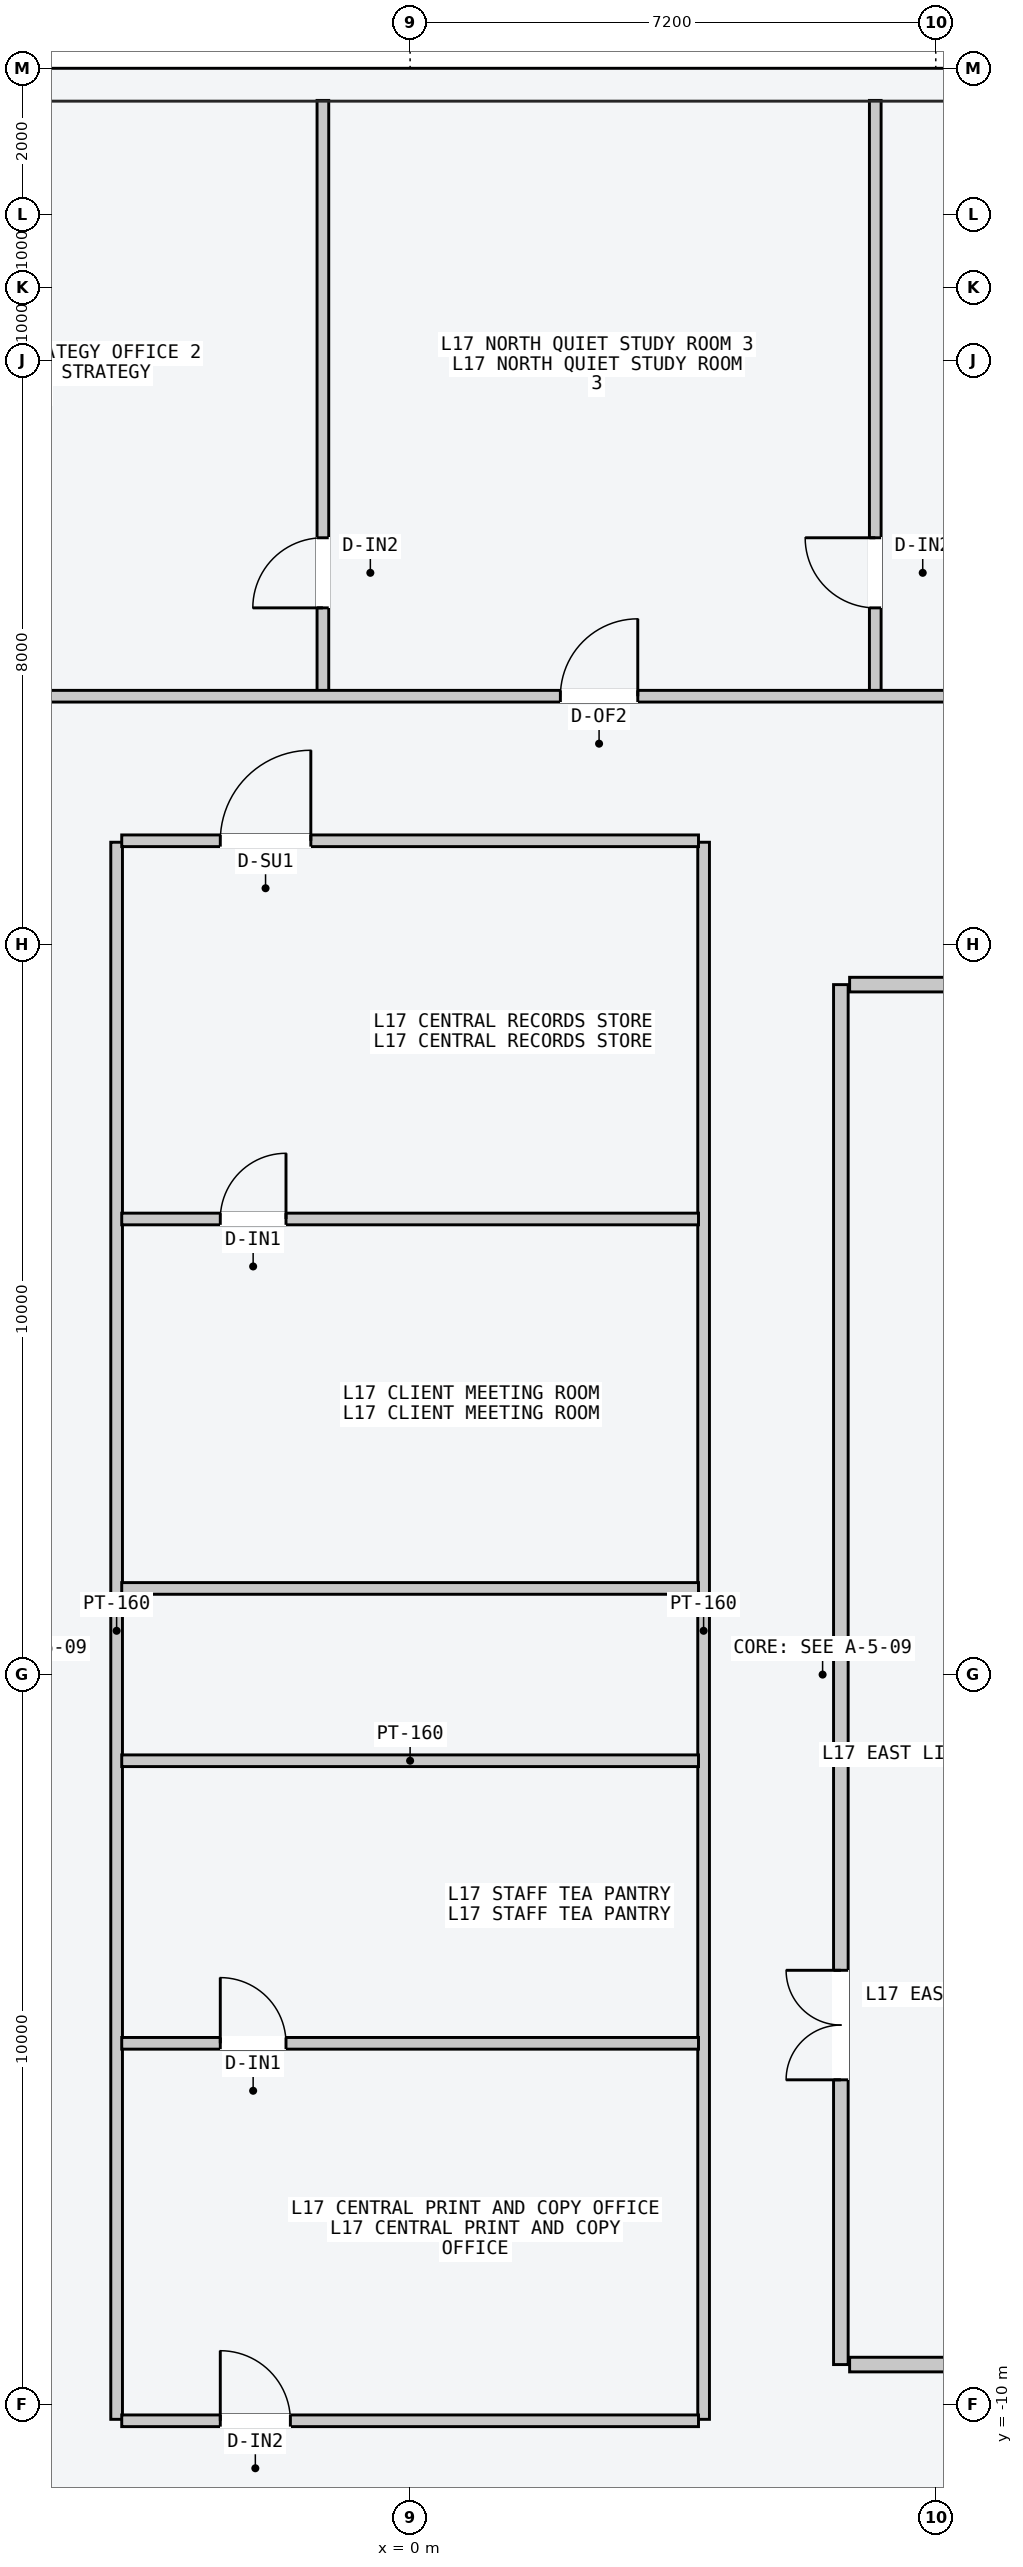
"""IFC4 building model, lengths in metres.
Left out: names, types, materials, properties, quantities, classifications, styles, units other than length and angle.
Written with IfcOpenShell. Run it as: python <this file> out.ifc"""

import sys

from ifc_helpers import new_model, si_unit, direction, frame, frame_2d, origin, place, context, subcontext, project, spatial, rectangle, extrude, element, fill, save


model = new_model("IFC4")
c1 = context("Model", 3, precision=1e-05, world=origin(), true_north=direction((0.0, 1.0)))
c2 = subcontext(c1, "Body", "Model", "MODEL_VIEW")
j1 = project(units=[si_unit("LENGTHUNIT", "METRE"), si_unit("PLANEANGLEUNIT", "RADIAN")], contexts=[c1])
p1 = place(None, origin())
s1 = spatial("IfcSite", under=j1, at=p1, CompositionType="ELEMENT")
p2 = place(p1, origin())
s2 = spatial("IfcBuilding", under=s1, at=p2, CompositionType="ELEMENT")
p3 = place(p2, frame((0.0, 0.0, 67.2)))
s3 = spatial("IfcBuildingStorey", under=s2, at=p3, CompositionType="ELEMENT", Elevation=67.2)
p4 = place(p3, frame((5.9, -9.45, 0.0), z_axis=(0.0, 0.0, 1.0), x_axis=(0.0, 1.0, 0.0)))
e1 = element("IfcWall", 1, at=p4, inside=s3, PredefinedType="PARTITIONING", context=c2, shape_type="SweptSolid", body=[
    extrude(rectangle(XDim=18.9, YDim=0.2, at=frame_2d((9.45, 0.0))), origin(), (0.0, 0.0, 1.0), 3.4),
])
p5 = place(p4, frame((3.9, 0.0, 0.0)))
e2 = element("IfcOpeningElement", 2, at=p5, cuts=e1, PredefinedType="OPENING", context=c2, shape_type="SweptSolid", body=[
    extrude(rectangle(XDim=1.5, YDim=2.2, at=frame_2d((0.75, 1.1))), frame((0.0, 0.11, 0.0), z_axis=(0.0, -1.0, 0.0), x_axis=(1.0, 0.0, 0.0)), (0.0, 0.0, 1.0), 0.22),
])
for number, where, z_axis, x_axis in (
    (3, (6.02, -9.45, 0.0), (0.0, 0.0, 1.0), (1.0, 0.0, 0.0)),
    (4, (6.02, 9.45, 0.0), (0.0, 0.0, 1.0), (1.0, 0.0, 0.0)),
):
    element("IfcWall", number, at=place(p3, frame(where, z_axis=z_axis, x_axis=x_axis)), inside=s3, PredefinedType="PARTITIONING", context=c2, shape_type="SweptSolid", body=[
        extrude(rectangle(XDim=1.8, YDim=0.2, at=frame_2d((0.9, 0.0))), origin(), (0.0, 0.0, 1.0), 3.4),
    ])
for number, where, z_axis, x_axis in (
    (5, (-4.02, -10.2, 0.0), (0.0, 0.0, 1.0), (0.0, 1.0, 0.0)),
    (6, (4.02, -10.2, 0.0), (0.0, 0.0, 1.0), (0.0, 1.0, 0.0)),
):
    element("IfcWall", number, at=place(p3, frame(where, z_axis=z_axis, x_axis=x_axis)), inside=s3, PredefinedType="PARTITIONING", context=c2, shape_type="SweptSolid", body=[
        extrude(rectangle(XDim=21.6, YDim=0.16, at=frame_2d((10.8, 0.0))), origin(), (0.0, 0.0, 1.0), 3.4),
    ])
p6 = place(p3, frame((-3.95, 1.18, 0.0), z_axis=(0.0, 0.0, 1.0), x_axis=(1.0, 0.0, 0.0)))
e7 = element("IfcWall", 7, at=p6, inside=s3, PredefinedType="PARTITIONING", context=c2, shape_type="SweptSolid", body=[
    extrude(rectangle(XDim=7.9, YDim=0.16, at=frame_2d((3.95, 0.0))), origin(), (0.0, 0.0, 1.0), 3.4),
])
p7 = place(p3, frame((-3.95, 11.42, 0.0), z_axis=(0.0, 0.0, 1.0), x_axis=(1.0, 0.0, 0.0)))
e8 = element("IfcWall", 8, at=p7, inside=s3, PredefinedType="PARTITIONING", context=c2, shape_type="SweptSolid", body=[
    extrude(rectangle(XDim=7.9, YDim=0.16, at=frame_2d((3.95, 0.0))), origin(), (0.0, 0.0, 1.0), 3.4),
])
p8 = place(p7, frame((1.35, 0.0, 0.0)))
e9 = element("IfcOpeningElement", 9, at=p8, cuts=e8, PredefinedType="OPENING", context=c2, shape_type="SweptSolid", body=[
    extrude(rectangle(XDim=1.24, YDim=2.24, at=frame_2d((0.62, 1.12))), frame((0.0, 0.09, 0.0), z_axis=(0.0, -1.0, 0.0), x_axis=(1.0, 0.0, 0.0)), (0.0, 0.0, 1.0), 0.18),
])
p9 = place(p3, frame((-3.95, -1.18, 0.0), z_axis=(0.0, 0.0, 1.0), x_axis=(1.0, 0.0, 0.0)))
e10 = element("IfcWall", 10, at=p9, inside=s3, PredefinedType="PARTITIONING", context=c2, shape_type="SweptSolid", body=[
    extrude(rectangle(XDim=7.9, YDim=0.16, at=frame_2d((3.95, 0.0))), origin(), (0.0, 0.0, 1.0), 3.4),
])
p10 = place(p3, frame((-3.95, -10.22, 0.0), z_axis=(0.0, 0.0, 1.0), x_axis=(1.0, 0.0, 0.0)))
e11 = element("IfcWall", 11, at=p10, inside=s3, PredefinedType="PARTITIONING", context=c2, shape_type="SweptSolid", body=[
    extrude(rectangle(XDim=7.9, YDim=0.16, at=frame_2d((3.95, 0.0))), origin(), (0.0, 0.0, 1.0), 3.4),
])
p11 = place(p10, frame((1.35, 0.0, 0.0)))
e12 = element("IfcOpeningElement", 12, at=p11, cuts=e11, PredefinedType="OPENING", context=c2, shape_type="SweptSolid", body=[
    extrude(rectangle(XDim=0.96, YDim=2.18, at=frame_2d((0.48, 1.09))), frame((0.0, 0.09, 0.0), z_axis=(0.0, -1.0, 0.0), x_axis=(1.0, 0.0, 0.0)), (0.0, 0.0, 1.0), 0.18),
])
p12 = place(p3, frame((-3.95, 6.24, 0.0), z_axis=(0.0, 0.0, 1.0), x_axis=(1.0, 0.0, 0.0)))
e13 = element("IfcWall", 13, at=p12, inside=s3, PredefinedType="PARTITIONING", context=c2, shape_type="SweptSolid", body=[
    extrude(rectangle(XDim=7.9, YDim=0.16, at=frame_2d((3.95, 0.0))), origin(), (0.0, 0.0, 1.0), 3.4),
])
p13 = place(p12, frame((1.35, 0.0, 0.0)))
e14 = element("IfcOpeningElement", 14, at=p13, cuts=e13, PredefinedType="OPENING", context=c2, shape_type="SweptSolid", body=[
    extrude(rectangle(XDim=0.9, YDim=2.15, at=frame_2d((0.45, 1.075))), frame((0.0, 0.09, 0.0), z_axis=(0.0, -1.0, 0.0), x_axis=(1.0, 0.0, 0.0)), (0.0, 0.0, 1.0), 0.18),
])
p14 = place(p3, frame((-3.95, -5.05, 0.0), z_axis=(0.0, 0.0, 1.0), x_axis=(1.0, 0.0, 0.0)))
e15 = element("IfcWall", 15, at=p14, inside=s3, PredefinedType="PARTITIONING", context=c2, shape_type="SweptSolid", body=[
    extrude(rectangle(XDim=7.9, YDim=0.16, at=frame_2d((3.95, 0.0))), origin(), (0.0, 0.0, 1.0), 3.4),
])
p15 = place(p14, frame((1.35, 0.0, 0.0)))
e16 = element("IfcOpeningElement", 16, at=p15, cuts=e15, PredefinedType="OPENING", context=c2, shape_type="SweptSolid", body=[
    extrude(rectangle(XDim=0.9, YDim=2.15, at=frame_2d((0.45, 1.075))), frame((0.0, 0.09, 0.0), z_axis=(0.0, -1.0, 0.0), x_axis=(1.0, 0.0, 0.0)), (0.0, 0.0, 1.0), 0.18),
])
p16 = place(p3, frame((-1.195, 13.46, 0.0), z_axis=(0.0, 0.0, 1.0), x_axis=(0.0, 1.0, 0.0)))
e17 = element("IfcWall", 17, at=p16, inside=s3, PredefinedType="PARTITIONING", context=c2, shape_type="SweptSolid", body=[
    extrude(rectangle(XDim=8.1, YDim=0.16, at=frame_2d((4.05, 0.0))), origin(), (0.0, 0.0, 1.0), 3.4),
])
p17 = place(p16, frame((1.15, 0.0, 0.0)))
e18 = element("IfcOpeningElement", 18, at=p17, cuts=e17, PredefinedType="OPENING", context=c2, shape_type="SweptSolid", body=[
    extrude(rectangle(XDim=0.96, YDim=2.18, at=frame_2d((0.48, 1.09))), frame((0.0, 0.09, 0.0), z_axis=(0.0, -1.0, 0.0), x_axis=(1.0, 0.0, 0.0)), (0.0, 0.0, 1.0), 0.18),
])
p18 = place(p3, frame((6.371, 13.46, 0.0), z_axis=(0.0, 0.0, 1.0), x_axis=(0.0, 1.0, 0.0)))
e19 = element("IfcWall", 19, at=p18, inside=s3, PredefinedType="PARTITIONING", context=c2, shape_type="SweptSolid", body=[
    extrude(rectangle(XDim=8.1, YDim=0.16, at=frame_2d((4.05, 0.0))), origin(), (0.0, 0.0, 1.0), 3.4),
])
p19 = place(p18, frame((1.15, 0.0, 0.0)))
e20 = element("IfcOpeningElement", 20, at=p19, cuts=e19, PredefinedType="OPENING", context=c2, shape_type="SweptSolid", body=[
    extrude(rectangle(XDim=0.96, YDim=2.18, at=frame_2d((0.48, 1.09))), frame((0.0, 0.09, 0.0), z_axis=(0.0, -1.0, 0.0), x_axis=(1.0, 0.0, 0.0)), (0.0, 0.0, 1.0), 0.18),
])
p20 = place(p3, frame((-19.2, 13.4, 0.0), z_axis=(0.0, 0.0, 1.0), x_axis=(1.0, 0.0, 0.0)))
e21 = element("IfcWall", 21, at=p20, inside=s3, PredefinedType="PARTITIONING", context=c2, shape_type="SweptSolid", body=[
    extrude(rectangle(XDim=38.4, YDim=0.16, at=frame_2d((19.2, 0.0))), origin(), (0.0, 0.0, 1.0), 3.4),
])
p21 = place(p20, frame((4.143, 0.0, 0.0)))
e22 = element("IfcOpeningElement", 22, at=p21, cuts=e21, PredefinedType="OPENING", context=c2, shape_type="SweptSolid", body=[
    extrude(rectangle(XDim=0.96, YDim=2.18, at=frame_2d((0.48, 1.09))), frame((0.0, 0.09, 0.0), z_axis=(0.0, -1.0, 0.0), x_axis=(1.0, 0.0, 0.0)), (0.0, 0.0, 1.0), 0.18),
])
p22 = place(p20, frame((13.115, 0.0, 0.0)))
e23 = element("IfcOpeningElement", 23, at=p22, cuts=e21, PredefinedType="OPENING", context=c2, shape_type="SweptSolid", body=[
    extrude(rectangle(XDim=1.02, YDim=2.2, at=frame_2d((0.51, 1.1))), frame((0.0, 0.09, 0.0), z_axis=(0.0, -1.0, 0.0), x_axis=(1.0, 0.0, 0.0)), (0.0, 0.0, 1.0), 0.18),
])
p23 = place(p20, frame((21.258, 0.0, 0.0)))
e24 = element("IfcOpeningElement", 24, at=p23, cuts=e21, PredefinedType="OPENING", context=c2, shape_type="SweptSolid", body=[
    extrude(rectangle(XDim=1.06, YDim=2.2, at=frame_2d((0.53, 1.1))), frame((0.0, 0.09, 0.0), z_axis=(0.0, -1.0, 0.0), x_axis=(1.0, 0.0, 0.0)), (0.0, 0.0, 1.0), 0.18),
])
p24 = place(p20, frame((28.535, 0.0, 0.0)))
e25 = element("IfcOpeningElement", 25, at=p24, cuts=e21, PredefinedType="OPENING", context=c2, shape_type="SweptSolid", body=[
    extrude(rectangle(XDim=1.24, YDim=2.24, at=frame_2d((0.62, 1.12))), frame((0.0, 0.09, 0.0), z_axis=(0.0, -1.0, 0.0), x_axis=(1.0, 0.0, 0.0)), (0.0, 0.0, 1.0), 0.18),
])
p25 = place(p20, frame((34.869, 0.0, 0.0)))
e26 = element("IfcOpeningElement", 26, at=p25, cuts=e21, PredefinedType="OPENING", context=c2, shape_type="SweptSolid", body=[
    extrude(rectangle(XDim=1.4, YDim=2.2, at=frame_2d((0.7, 1.1))), frame((0.0, 0.09, 0.0), z_axis=(0.0, -1.0, 0.0), x_axis=(1.0, 0.0, 0.0)), (0.0, 0.0, 1.0), 0.18),
])
p26 = place(p5, origin())
e27 = element("IfcDoor", 27, at=p26, inside=s3, OperationType="DOUBLE_DOOR_SINGLE_SWING", PredefinedType="DOOR", context=c2, shape_type="SweptSolid", body=[
    extrude(rectangle(XDim=1.5, YDim=2.2, at=frame_2d((0.75, 1.1))), frame((0.0, 0.025, 0.0), z_axis=(0.0, -1.0, 0.0), x_axis=(1.0, 0.0, 0.0)), (0.0, 0.0, 1.0), 0.05),
])
fill(e2, e27)
p27 = place(p8, origin())
e28 = element("IfcDoor", 28, at=p27, inside=s3, OperationType="SINGLE_SWING_RIGHT", PredefinedType="DOOR", context=c2, shape_type="SweptSolid", body=[
    extrude(rectangle(XDim=1.24, YDim=2.24, at=frame_2d((0.62, 1.12))), frame((0.0, 0.025, 0.0), z_axis=(0.0, -1.0, 0.0), x_axis=(1.0, 0.0, 0.0)), (0.0, 0.0, 1.0), 0.05),
])
fill(e9, e28)
p28 = place(p11, origin())
e29 = element("IfcDoor", 29, at=p28, inside=s3, OperationType="SINGLE_SWING_LEFT", PredefinedType="DOOR", context=c2, shape_type="SweptSolid", body=[
    extrude(rectangle(XDim=0.96, YDim=2.18, at=frame_2d((0.48, 1.09))), frame((0.0, 0.025, 0.0), z_axis=(0.0, -1.0, 0.0), x_axis=(1.0, 0.0, 0.0)), (0.0, 0.0, 1.0), 0.05),
])
fill(e12, e29)
p29 = place(p13, origin())
e30 = element("IfcDoor", 30, at=p29, inside=s3, OperationType="SINGLE_SWING_RIGHT", PredefinedType="DOOR", context=c2, shape_type="SweptSolid", body=[
    extrude(rectangle(XDim=0.9, YDim=2.15, at=frame_2d((0.45, 1.075))), frame((0.0, 0.025, 0.0), z_axis=(0.0, -1.0, 0.0), x_axis=(1.0, 0.0, 0.0)), (0.0, 0.0, 1.0), 0.05),
])
fill(e14, e30)
p30 = place(p15, origin())
e31 = element("IfcDoor", 31, at=p30, inside=s3, OperationType="SINGLE_SWING_LEFT", PredefinedType="DOOR", context=c2, shape_type="SweptSolid", body=[
    extrude(rectangle(XDim=0.9, YDim=2.15, at=frame_2d((0.45, 1.075))), frame((0.0, 0.025, 0.0), z_axis=(0.0, -1.0, 0.0), x_axis=(1.0, 0.0, 0.0)), (0.0, 0.0, 1.0), 0.05),
])
fill(e16, e31)
p31 = place(p17, origin())
e32 = element("IfcDoor", 32, at=p31, inside=s3, OperationType="SINGLE_SWING_LEFT", PredefinedType="DOOR", context=c2, shape_type="SweptSolid", body=[
    extrude(rectangle(XDim=0.96, YDim=2.18, at=frame_2d((0.48, 1.09))), frame((0.0, 0.025, 0.0), z_axis=(0.0, -1.0, 0.0), x_axis=(1.0, 0.0, 0.0)), (0.0, 0.0, 1.0), 0.05),
])
fill(e18, e32)
p32 = place(p19, origin())
e33 = element("IfcDoor", 33, at=p32, inside=s3, OperationType="SINGLE_SWING_RIGHT", PredefinedType="DOOR", context=c2, shape_type="SweptSolid", body=[
    extrude(rectangle(XDim=0.96, YDim=2.18, at=frame_2d((0.48, 1.09))), frame((0.0, 0.025, 0.0), z_axis=(0.0, -1.0, 0.0), x_axis=(1.0, 0.0, 0.0)), (0.0, 0.0, 1.0), 0.05),
])
fill(e20, e33)
p33 = place(p23, origin())
e34 = element("IfcDoor", 34, at=p33, inside=s3, OperationType="SINGLE_SWING_RIGHT", PredefinedType="DOOR", context=c2, shape_type="SweptSolid", body=[
    extrude(rectangle(XDim=1.06, YDim=2.2, at=frame_2d((0.53, 1.1))), frame((0.0, 0.025, 0.0), z_axis=(0.0, -1.0, 0.0), x_axis=(1.0, 0.0, 0.0)), (0.0, 0.0, 1.0), 0.05),
])
fill(e24, e34)
save(model, sys.argv[1])
